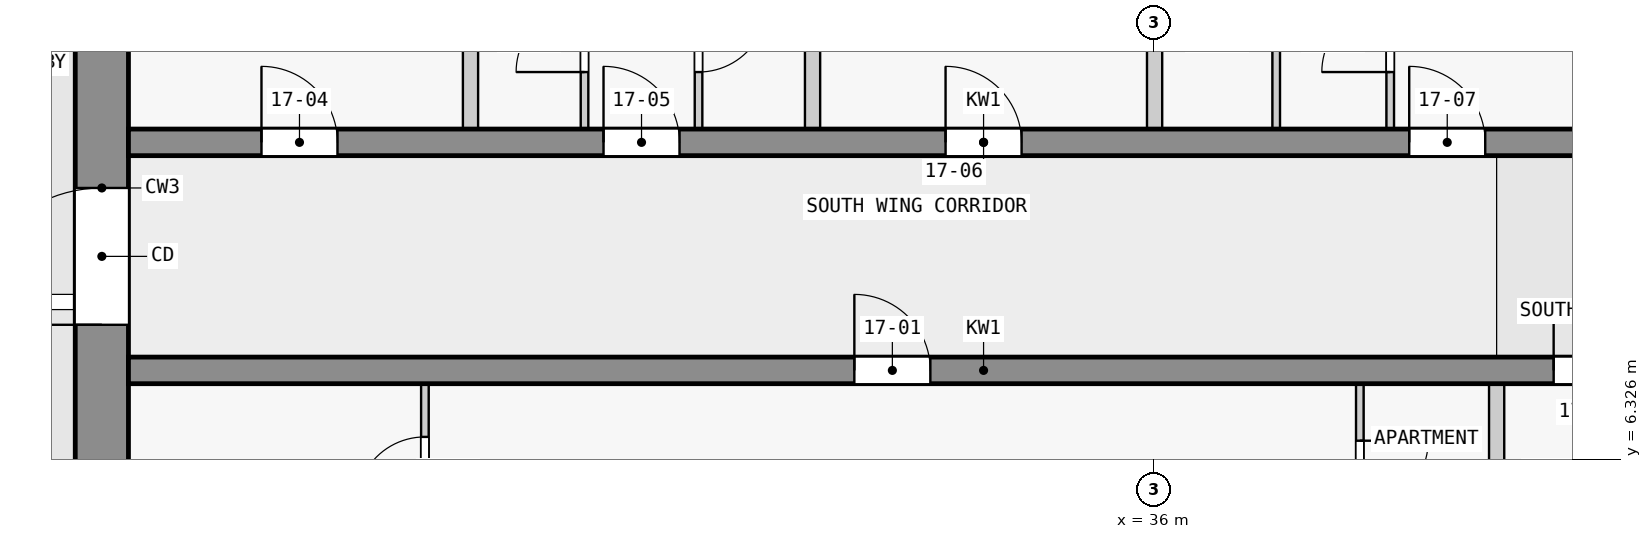
"""IFC4 building model, lengths in metres.
Left out: names, types, materials, properties, quantities, classifications, styles, units other than length and angle.
Written with IfcOpenShell. Run it as: python <this file> out.ifc"""

import sys

from ifc_helpers import new_model, si_unit, direction, frame, frame_2d, origin, place, context, subcontext, project, spatial, rectangle, extrude, element, fill, save


model = new_model("IFC4")
c1 = context("Model", 3, precision=1e-05, world=origin(), true_north=direction((0.0, 1.0)))
c2 = subcontext(c1, "Body", "Model", "MODEL_VIEW")
j1 = project(units=[si_unit("LENGTHUNIT", "METRE"), si_unit("PLANEANGLEUNIT", "RADIAN")], contexts=[c1])
p1 = place(None, origin())
s1 = spatial("IfcSite", under=j1, at=p1, CompositionType="ELEMENT")
p2 = place(p1, origin())
s2 = spatial("IfcBuilding", under=s1, at=p2, CompositionType="ELEMENT")
p3 = place(p2, frame((0.0, 0.0, 68.8)))
s3 = spatial("IfcBuildingStorey", under=s2, at=p3, CompositionType="ELEMENT", Elevation=68.8)
p4 = place(p3, frame((22.15, 2.5, 0.0), z_axis=(0.0, 0.0, 1.0), x_axis=(0.0, 1.0, 0.0)))
e1 = element("IfcWall", 1, at=p4, inside=s3, PredefinedType="SHEAR", context=c2, shape_type="SweptSolid", body=[
    extrude(rectangle(XDim=14.8, YDim=0.7, at=frame_2d((7.4, 0.0))), origin(), (0.0, 0.0, 1.0), 3.2),
])
p5 = place(p4, frame((5.6, 0.0, 0.0)))
e2 = element("IfcOpeningElement", 2, at=p5, cuts=e1, PredefinedType="OPENING", context=c2, shape_type="SweptSolid", body=[
    extrude(rectangle(XDim=1.8, YDim=2.1, at=frame_2d((0.9, 1.05))), frame((0.0, 0.36, 0.0), z_axis=(0.0, -1.0, 0.0), x_axis=(1.0, 0.0, 0.0)), (0.0, 0.0, 1.0), 0.72),
])
p6 = place(p3, frame((22.5, 7.5, 0.0), z_axis=(0.0, 0.0, 1.0), x_axis=(1.0, 0.0, 0.0)))
e3 = element("IfcWall", 3, at=p6, inside=s3, PredefinedType="SHEAR", context=c2, shape_type="SweptSolid", body=[
    extrude(rectangle(XDim=22.5, YDim=0.35, at=frame_2d((11.25, 0.0))), origin(), (0.0, 0.0, 1.0), 3.2),
])
p7 = place(p6, frame((9.55, 0.0, 0.0)))
e4 = element("IfcOpeningElement", 4, at=p7, cuts=e3, PredefinedType="OPENING", context=c2, shape_type="SweptSolid", body=[
    extrude(rectangle(XDim=1.0, YDim=2.1, at=frame_2d((0.5, 1.05))), frame((0.0, 0.185, 0.0), z_axis=(0.0, -1.0, 0.0), x_axis=(1.0, 0.0, 0.0)), (0.0, 0.0, 1.0), 0.37),
])
p8 = place(p6, frame((18.75, 0.0, 0.0)))
e5 = element("IfcOpeningElement", 5, at=p8, cuts=e3, PredefinedType="OPENING", context=c2, shape_type="SweptSolid", body=[
    extrude(rectangle(XDim=0.9, YDim=2.1, at=frame_2d((0.45, 1.05))), frame((0.0, 0.185, 0.0), z_axis=(0.0, -1.0, 0.0), x_axis=(1.0, 0.0, 0.0)), (0.0, 0.0, 1.0), 0.37),
])
p9 = place(p6, frame((20.95, 0.0, 0.0)))
e6 = element("IfcOpeningElement", 6, at=p9, cuts=e3, PredefinedType="OPENING", context=c2, shape_type="SweptSolid", body=[
    extrude(rectangle(XDim=1.0, YDim=2.1, at=frame_2d((0.5, 1.05))), frame((0.0, 0.185, 0.0), z_axis=(0.0, -1.0, 0.0), x_axis=(1.0, 0.0, 0.0)), (0.0, 0.0, 1.0), 0.37),
])
p10 = place(p3, frame((22.5, 10.5, 0.0), z_axis=(0.0, 0.0, 1.0), x_axis=(1.0, 0.0, 0.0)))
e7 = element("IfcWall", 7, at=p10, inside=s3, PredefinedType="SHEAR", context=c2, shape_type="SweptSolid", body=[
    extrude(rectangle(XDim=22.5, YDim=0.35, at=frame_2d((11.25, 0.0))), origin(), (0.0, 0.0, 1.0), 3.2),
])
p11 = place(p10, frame((1.75, 0.0, 0.0)))
e8 = element("IfcOpeningElement", 8, at=p11, cuts=e7, PredefinedType="OPENING", context=c2, shape_type="SweptSolid", body=[
    extrude(rectangle(XDim=1.0, YDim=2.1, at=frame_2d((0.5, 1.05))), frame((0.0, 0.185, 0.0), z_axis=(0.0, -1.0, 0.0), x_axis=(1.0, 0.0, 0.0)), (0.0, 0.0, 1.0), 0.37),
])
p12 = place(p10, frame((6.25, 0.0, 0.0)))
e9 = element("IfcOpeningElement", 9, at=p12, cuts=e7, PredefinedType="OPENING", context=c2, shape_type="SweptSolid", body=[
    extrude(rectangle(XDim=1.0, YDim=2.1, at=frame_2d((0.5, 1.05))), frame((0.0, 0.185, 0.0), z_axis=(0.0, -1.0, 0.0), x_axis=(1.0, 0.0, 0.0)), (0.0, 0.0, 1.0), 0.37),
])
p13 = place(p10, frame((10.75, 0.0, 0.0)))
e10 = element("IfcOpeningElement", 10, at=p13, cuts=e7, PredefinedType="OPENING", context=c2, shape_type="SweptSolid", body=[
    extrude(rectangle(XDim=1.0, YDim=2.1, at=frame_2d((0.5, 1.05))), frame((0.0, 0.185, 0.0), z_axis=(0.0, -1.0, 0.0), x_axis=(1.0, 0.0, 0.0)), (0.0, 0.0, 1.0), 0.37),
])
p14 = place(p10, frame((16.85, 0.0, 0.0)))
e11 = element("IfcOpeningElement", 11, at=p14, cuts=e7, PredefinedType="OPENING", context=c2, shape_type="SweptSolid", body=[
    extrude(rectangle(XDim=1.0, YDim=2.1, at=frame_2d((0.5, 1.05))), frame((0.0, 0.185, 0.0), z_axis=(0.0, -1.0, 0.0), x_axis=(1.0, 0.0, 0.0)), (0.0, 0.0, 1.0), 0.37),
])
p15 = place(p3, frame((26.4, 4.975, 0.0), z_axis=(0.0, 0.0, 1.0), x_axis=(0.0, 1.0, 0.0)))
e12 = element("IfcWall", 12, at=p15, inside=s3, PredefinedType="PARTITIONING", context=c2, shape_type="SweptSolid", body=[
    extrude(rectangle(XDim=2.35, YDim=0.1, at=frame_2d((1.175, 0.0))), origin(), (0.0, 0.0, 1.0), 3.2),
])
p16 = place(p15, frame((0.75, 0.0, 0.0)))
e13 = element("IfcOpeningElement", 13, at=p16, cuts=e12, PredefinedType="OPENING", context=c2, shape_type="SweptSolid", body=[
    extrude(rectangle(XDim=0.9, YDim=2.1, at=frame_2d((0.45, 1.05))), frame((0.0, 0.06, 0.0), z_axis=(0.0, -1.0, 0.0), x_axis=(1.0, 0.0, 0.0)), (0.0, 0.0, 1.0), 0.12),
])
p17 = place(p3, frame((27.0, 10.675, 0.0), z_axis=(0.0, 0.0, 1.0), x_axis=(0.0, 1.0, 0.0)))
e14 = element("IfcWall", 14, at=p17, inside=s3, PredefinedType="PARTITIONING", context=c2, shape_type="SweptSolid", body=[
    extrude(rectangle(XDim=5.798, YDim=0.2, at=frame_2d((2.899, 0.0))), origin(), (0.0, 0.0, 1.0), 3.2),
])
p18 = place(p3, frame((28.5, 10.675, 0.0), z_axis=(0.0, 0.0, 1.0), x_axis=(0.0, 1.0, 0.0)))
e15 = element("IfcWall", 15, at=p18, inside=s3, PredefinedType="PARTITIONING", context=c2, shape_type="SweptSolid", body=[
    extrude(rectangle(XDim=2.4, YDim=0.1, at=frame_2d((1.2, 0.0))), origin(), (0.0, 0.0, 1.0), 3.2),
])
p19 = place(p18, frame((0.75, 0.0, 0.0)))
e16 = element("IfcOpeningElement", 16, at=p19, cuts=e15, PredefinedType="OPENING", context=c2, shape_type="SweptSolid", body=[
    extrude(rectangle(XDim=0.9, YDim=2.1, at=frame_2d((0.45, 1.05))), frame((0.0, 0.06, 0.0), z_axis=(0.0, -1.0, 0.0), x_axis=(1.0, 0.0, 0.0)), (0.0, 0.0, 1.0), 0.12),
])
p20 = place(p3, frame((30.0, 13.075, 0.0), z_axis=(0.0, 0.0, 1.0), x_axis=(0.0, -1.0, 0.0)))
e17 = element("IfcWall", 17, at=p20, inside=s3, PredefinedType="PARTITIONING", context=c2, shape_type="SweptSolid", body=[
    extrude(rectangle(XDim=2.4, YDim=0.1, at=frame_2d((1.2, 0.0))), origin(), (0.0, 0.0, 1.0), 3.2),
])
p21 = place(p20, frame((0.75, 0.0, 0.0)))
e18 = element("IfcOpeningElement", 18, at=p21, cuts=e17, PredefinedType="OPENING", context=c2, shape_type="SweptSolid", body=[
    extrude(rectangle(XDim=0.9, YDim=2.1, at=frame_2d((0.45, 1.05))), frame((0.0, 0.06, 0.0), z_axis=(0.0, -1.0, 0.0), x_axis=(1.0, 0.0, 0.0)), (0.0, 0.0, 1.0), 0.12),
])
p22 = place(p3, frame((31.5, 10.675, 0.0), z_axis=(0.0, 0.0, 1.0), x_axis=(0.0, 1.0, 0.0)))
e19 = element("IfcWall", 19, at=p22, inside=s3, PredefinedType="PARTITIONING", context=c2, shape_type="SweptSolid", body=[
    extrude(rectangle(XDim=2.3, YDim=0.2, at=frame_2d((1.15, 0.0))), origin(), (0.0, 0.0, 1.0), 3.2),
])
p23 = place(p3, frame((36.0, 10.675, 0.0), z_axis=(0.0, 0.0, 1.0), x_axis=(0.0, 1.0, 0.0)))
e20 = element("IfcWall", 20, at=p23, inside=s3, PredefinedType="PARTITIONING", context=c2, shape_type="SweptSolid", body=[
    extrude(rectangle(XDim=5.925, YDim=0.2, at=frame_2d((2.962, 0.0))), origin(), (0.0, 0.0, 1.0), 3.2),
])
p24 = place(p3, frame((37.6, 10.675, 0.0), z_axis=(0.0, 0.0, 1.0), x_axis=(0.0, 1.0, 0.0)))
e21 = element("IfcWall", 21, at=p24, inside=s3, PredefinedType="PARTITIONING", context=c2, shape_type="SweptSolid", body=[
    extrude(rectangle(XDim=2.35, YDim=0.1, at=frame_2d((1.175, 0.0))), origin(), (0.0, 0.0, 1.0), 3.2),
])
p25 = place(p3, frame((38.7, 7.325, 0.0), z_axis=(0.0, 0.0, 1.0), x_axis=(0.0, -1.0, 0.0)))
e22 = element("IfcWall", 22, at=p25, inside=s3, PredefinedType="PARTITIONING", context=c2, shape_type="SweptSolid", body=[
    extrude(rectangle(XDim=2.35, YDim=0.1, at=frame_2d((1.175, 0.0))), origin(), (0.0, 0.0, 1.0), 3.2),
])
p26 = place(p25, frame((0.75, 0.0, 0.0)))
e23 = element("IfcOpeningElement", 23, at=p26, cuts=e22, PredefinedType="OPENING", context=c2, shape_type="SweptSolid", body=[
    extrude(rectangle(XDim=0.9, YDim=2.1, at=frame_2d((0.45, 1.05))), frame((0.0, 0.06, 0.0), z_axis=(0.0, -1.0, 0.0), x_axis=(1.0, 0.0, 0.0)), (0.0, 0.0, 1.0), 0.12),
])
p27 = place(p3, frame((39.1, 10.675, 0.0), z_axis=(0.0, 0.0, 1.0), x_axis=(0.0, 1.0, 0.0)))
e24 = element("IfcWall", 24, at=p27, inside=s3, PredefinedType="PARTITIONING", context=c2, shape_type="SweptSolid", body=[
    extrude(rectangle(XDim=2.35, YDim=0.1, at=frame_2d((1.175, 0.0))), origin(), (0.0, 0.0, 1.0), 3.2),
])
p28 = place(p27, frame((0.75, 0.0, 0.0)))
e25 = element("IfcOpeningElement", 25, at=p28, cuts=e24, PredefinedType="OPENING", context=c2, shape_type="SweptSolid", body=[
    extrude(rectangle(XDim=0.9, YDim=2.1, at=frame_2d((0.45, 1.05))), frame((0.0, 0.06, 0.0), z_axis=(0.0, -1.0, 0.0), x_axis=(1.0, 0.0, 0.0)), (0.0, 0.0, 1.0), 0.12),
])
p29 = place(p3, frame((40.5, 1.122, 0.0), z_axis=(0.0, 0.0, 1.0), x_axis=(0.0, 1.0, 0.0)))
e26 = element("IfcWall", 26, at=p29, inside=s3, PredefinedType="PARTITIONING", context=c2, shape_type="SweptSolid", body=[
    extrude(rectangle(XDim=6.203, YDim=0.2, at=frame_2d((3.101, 0.0))), origin(), (0.0, 0.0, 1.0), 3.2),
])
p30 = place(p5, origin())
e27 = element("IfcDoor", 27, at=p30, inside=s3, OperationType="DOUBLE_DOOR_SINGLE_SWING", PredefinedType="DOOR", context=c2, shape_type="SweptSolid", body=[
    extrude(rectangle(XDim=1.8, YDim=2.1, at=frame_2d((0.9, 1.05))), frame((0.0, 0.025, 0.0), z_axis=(0.0, -1.0, 0.0), x_axis=(1.0, 0.0, 0.0)), (0.0, 0.0, 1.0), 0.05),
])
fill(e2, e27)
p31 = place(p7, origin())
e28 = element("IfcDoor", 28, at=p31, inside=s3, OperationType="SINGLE_SWING_LEFT", PredefinedType="DOOR", context=c2, shape_type="SweptSolid", body=[
    extrude(rectangle(XDim=1.0, YDim=2.1, at=frame_2d((0.5, 1.05))), frame((0.0, 0.025, 0.0), z_axis=(0.0, -1.0, 0.0), x_axis=(1.0, 0.0, 0.0)), (0.0, 0.0, 1.0), 0.05),
])
fill(e4, e28)
p32 = place(p8, origin())
e29 = element("IfcDoor", 29, at=p32, inside=s3, OperationType="SINGLE_SWING_RIGHT", PredefinedType="DOOR", context=c2, shape_type="SweptSolid", body=[
    extrude(rectangle(XDim=0.9, YDim=2.1, at=frame_2d((0.45, 1.05))), frame((0.0, 0.025, 0.0), z_axis=(0.0, -1.0, 0.0), x_axis=(1.0, 0.0, 0.0)), (0.0, 0.0, 1.0), 0.05),
])
fill(e5, e29)
p33 = place(p11, origin())
e30 = element("IfcDoor", 30, at=p33, inside=s3, OperationType="SINGLE_SWING_LEFT", PredefinedType="DOOR", context=c2, shape_type="SweptSolid", body=[
    extrude(rectangle(XDim=1.0, YDim=2.1, at=frame_2d((0.5, 1.05))), frame((0.0, 0.025, 0.0), z_axis=(0.0, -1.0, 0.0), x_axis=(1.0, 0.0, 0.0)), (0.0, 0.0, 1.0), 0.05),
])
fill(e8, e30)
p34 = place(p12, origin())
e31 = element("IfcDoor", 31, at=p34, inside=s3, OperationType="SINGLE_SWING_LEFT", PredefinedType="DOOR", context=c2, shape_type="SweptSolid", body=[
    extrude(rectangle(XDim=1.0, YDim=2.1, at=frame_2d((0.5, 1.05))), frame((0.0, 0.025, 0.0), z_axis=(0.0, -1.0, 0.0), x_axis=(1.0, 0.0, 0.0)), (0.0, 0.0, 1.0), 0.05),
])
fill(e9, e31)
p35 = place(p13, origin())
e32 = element("IfcDoor", 32, at=p35, inside=s3, OperationType="SINGLE_SWING_LEFT", PredefinedType="DOOR", context=c2, shape_type="SweptSolid", body=[
    extrude(rectangle(XDim=1.0, YDim=2.1, at=frame_2d((0.5, 1.05))), frame((0.0, 0.025, 0.0), z_axis=(0.0, -1.0, 0.0), x_axis=(1.0, 0.0, 0.0)), (0.0, 0.0, 1.0), 0.05),
])
fill(e10, e32)
p36 = place(p14, origin())
e33 = element("IfcDoor", 33, at=p36, inside=s3, OperationType="SINGLE_SWING_RIGHT", PredefinedType="DOOR", context=c2, shape_type="SweptSolid", body=[
    extrude(rectangle(XDim=1.0, YDim=2.1, at=frame_2d((0.5, 1.05))), frame((0.0, 0.025, 0.0), z_axis=(0.0, -1.0, 0.0), x_axis=(1.0, 0.0, 0.0)), (0.0, 0.0, 1.0), 0.05),
])
fill(e11, e33)
p37 = place(p16, origin())
e34 = element("IfcDoor", 34, at=p37, inside=s3, OperationType="SINGLE_SWING_RIGHT", PredefinedType="DOOR", context=c2, shape_type="SweptSolid", body=[
    extrude(rectangle(XDim=0.9, YDim=2.1, at=frame_2d((0.45, 1.05))), frame((0.0, 0.025, 0.0), z_axis=(0.0, -1.0, 0.0), x_axis=(1.0, 0.0, 0.0)), (0.0, 0.0, 1.0), 0.05),
])
fill(e13, e34)
p38 = place(p26, origin())
e35 = element("IfcDoor", 35, at=p38, inside=s3, OperationType="SINGLE_SWING_RIGHT", PredefinedType="DOOR", context=c2, shape_type="SweptSolid", body=[
    extrude(rectangle(XDim=0.9, YDim=2.1, at=frame_2d((0.45, 1.05))), frame((0.0, 0.025, 0.0), z_axis=(0.0, -1.0, 0.0), x_axis=(1.0, 0.0, 0.0)), (0.0, 0.0, 1.0), 0.05),
])
fill(e23, e35)
p39 = place(p19, origin())
e36 = element("IfcDoor", 36, at=p39, inside=s3, OperationType="SINGLE_SWING_RIGHT", PredefinedType="DOOR", context=c2, shape_type="SweptSolid", body=[
    extrude(rectangle(XDim=0.9, YDim=2.1, at=frame_2d((0.45, 1.05))), frame((0.0, 0.025, 0.0), z_axis=(0.0, -1.0, 0.0), x_axis=(1.0, 0.0, 0.0)), (0.0, 0.0, 1.0), 0.05),
])
fill(e16, e36)
p40 = place(p21, origin())
e37 = element("IfcDoor", 37, at=p40, inside=s3, OperationType="SINGLE_SWING_RIGHT", PredefinedType="DOOR", context=c2, shape_type="SweptSolid", body=[
    extrude(rectangle(XDim=0.9, YDim=2.1, at=frame_2d((0.45, 1.05))), frame((0.0, 0.025, 0.0), z_axis=(0.0, -1.0, 0.0), x_axis=(1.0, 0.0, 0.0)), (0.0, 0.0, 1.0), 0.05),
])
fill(e18, e37)
p41 = place(p28, origin())
e38 = element("IfcDoor", 38, at=p41, inside=s3, OperationType="SINGLE_SWING_RIGHT", PredefinedType="DOOR", context=c2, shape_type="SweptSolid", body=[
    extrude(rectangle(XDim=0.9, YDim=2.1, at=frame_2d((0.45, 1.05))), frame((0.0, 0.025, 0.0), z_axis=(0.0, -1.0, 0.0), x_axis=(1.0, 0.0, 0.0)), (0.0, 0.0, 1.0), 0.05),
])
fill(e25, e38)
save(model, sys.argv[1])
